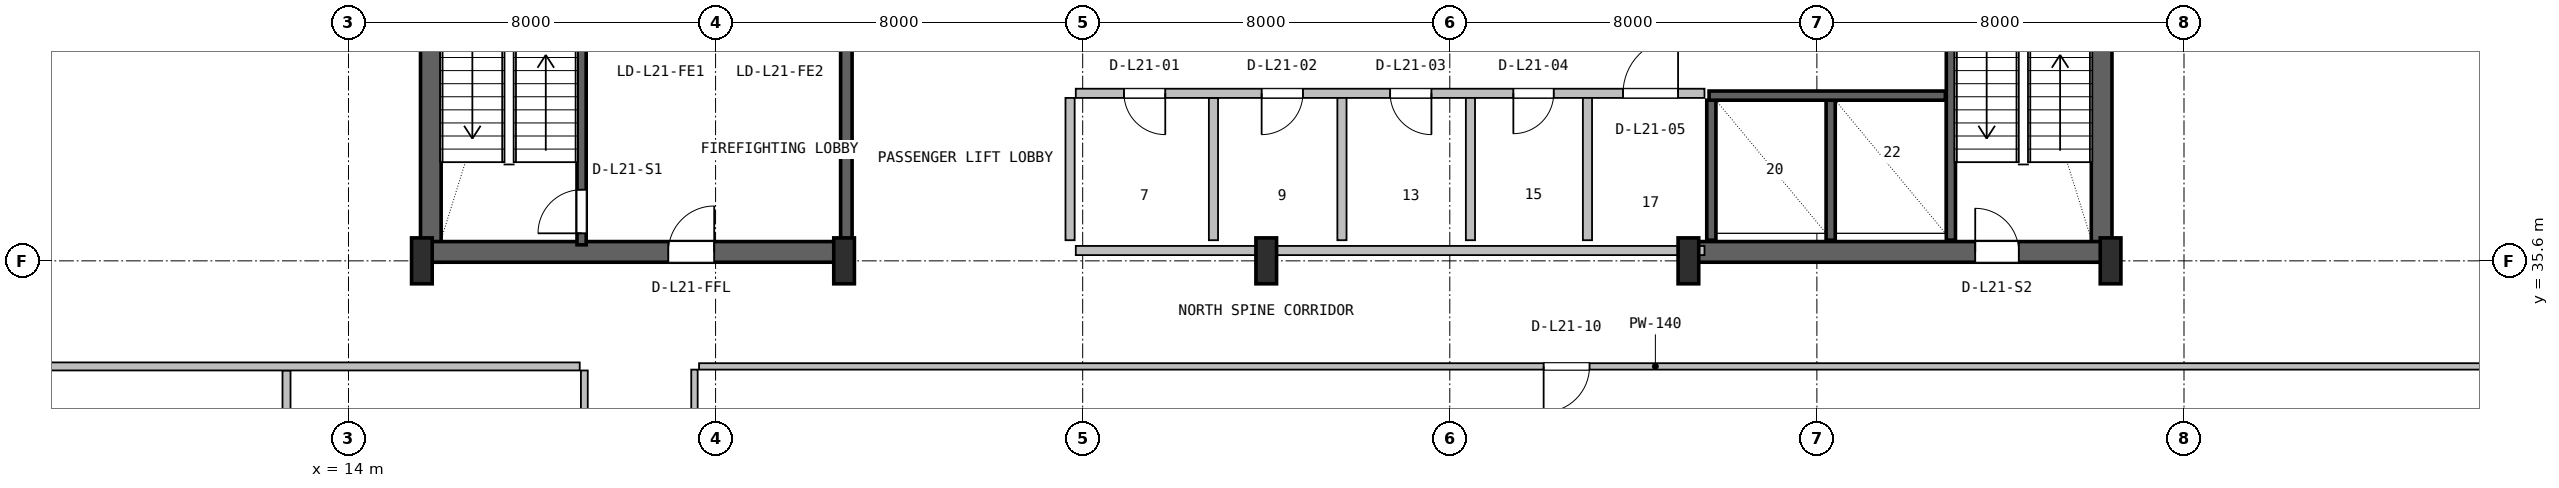
"""IFC4 building model, lengths in metres.
Left out: names, types, materials, properties, quantities, classifications, styles, units other than length and angle.
Written with IfcOpenShell. Run it as: python <this file> out.ifc"""

import sys

from ifc_helpers import new_model, si_unit, direction, frame, frame_2d, origin, origin_2d, place, context, subcontext, project, spatial, rectangle, i_section, extrude, source, transform, mapped, element, fill, save


model = new_model("IFC4")
c1 = context("Model", 3, precision=1e-05, world=origin(), true_north=direction((0.0, 1.0)))
c2 = subcontext(c1, "Body", "Model", "MODEL_VIEW")
j1 = project(units=[si_unit("LENGTHUNIT", "METRE"), si_unit("PLANEANGLEUNIT", "RADIAN")], contexts=[c1])
p1 = place(None, origin())
s1 = spatial("IfcSite", under=j1, at=p1, CompositionType="ELEMENT")
p2 = place(p1, origin())
s2 = spatial("IfcBuilding", under=s1, at=p2, CompositionType="ELEMENT")
p3 = place(p2, frame((0.0, 0.0, 90.8)))
s3 = spatial("IfcBuildingStorey", under=s2, at=p3, CompositionType="ELEMENT", Elevation=90.8)
for number, where, z_axis, x_axis in (
    (1, (15.795, 35.57, 0.0), (0.0, 0.0, 1.0), (0.0, 1.0, 0.0)),
    (2, (52.205, 35.57, 0.0), (0.0, 0.0, 1.0), (0.0, 1.0, 0.0)),
):
    element("IfcWall", number, at=place(p3, frame(where, z_axis=z_axis, x_axis=x_axis)), inside=s3, PredefinedType="SHEAR", context=c2, shape_type="SweptSolid", body=[
        extrude(rectangle(XDim=11.23, YDim=0.45, at=frame_2d((5.615, 0.0))), origin(), (0.0, 0.0, 1.0), 3.55),
    ])
p4 = place(p3, frame((15.57, 35.795, 0.0), z_axis=(0.0, 0.0, 1.0), x_axis=(1.0, 0.0, 0.0)))
e3 = element("IfcWall", 3, at=p4, inside=s3, PredefinedType="SHEAR", context=c2, shape_type="SweptSolid", body=[
    extrude(rectangle(XDim=9.23, YDim=0.45, at=frame_2d((4.615, 0.0))), origin(), (0.0, 0.0, 1.0), 3.55),
])
p5 = place(p4, frame((5.4, 0.0, 0.0)))
e4 = element("IfcOpeningElement", 4, at=p5, cuts=e3, PredefinedType="OPENING", context=c2, shape_type="SweptSolid", body=[
    extrude(rectangle(XDim=1.0, YDim=2.1, at=frame_2d((0.5, 1.05))), frame((0.0, 0.235, 0.0), z_axis=(0.0, -1.0, 0.0), x_axis=(1.0, 0.0, 0.0)), (0.0, 0.0, 1.0), 0.47),
])
p6 = place(p3, frame((43.2, 35.795, 0.0), z_axis=(0.0, 0.0, 1.0), x_axis=(1.0, 0.0, 0.0)))
e5 = element("IfcWall", 5, at=p6, inside=s3, PredefinedType="SHEAR", context=c2, shape_type="SweptSolid", body=[
    extrude(rectangle(XDim=9.23, YDim=0.45, at=frame_2d((4.615, 0.0))), origin(), (0.0, 0.0, 1.0), 3.55),
])
p7 = place(p6, frame((6.25, 0.0, 0.0)))
e6 = element("IfcOpeningElement", 6, at=p7, cuts=e5, PredefinedType="OPENING", context=c2, shape_type="SweptSolid", body=[
    extrude(rectangle(XDim=0.95, YDim=2.1, at=frame_2d((0.475, 1.05))), frame((0.0, 0.235, 0.0), z_axis=(0.0, -1.0, 0.0), x_axis=(1.0, 0.0, 0.0)), (0.0, 0.0, 1.0), 0.47),
])
m1 = source(origin(), c2, "Body", "SweptSolid", [
    extrude(i_section(OverallWidth=0.45, OverallDepth=1.0, WebThickness=0.016, FlangeThickness=0.03, FilletRadius=0.016, at=origin_2d()), origin(), (0.0, 0.0, 1.0), 3.8),
])
for number, where, z_axis, x_axis in (
    (7, (15.6, 35.6, 0.0), (0.0, 0.0, 1.0), (1.0, 0.0, 0.0)),
    (8, (24.8, 35.6, 0.0), (0.0, 0.0, 1.0), (1.0, 0.0, 0.0)),
    (9, (34.0, 35.6, 0.0), (0.0, 0.0, 1.0), (1.0, 0.0, 0.0)),
    (10, (43.2, 35.6, 0.0), (0.0, 0.0, 1.0), (1.0, 0.0, 0.0)),
    (11, (52.4, 35.6, 0.0), (0.0, 0.0, 1.0), (1.0, 0.0, 0.0)),
):
    element("IfcColumn", number, at=place(p3, frame(where, z_axis=z_axis, x_axis=x_axis)), inside=s3, PredefinedType="COLUMN", context=c2, shape_type="MappedRepresentation", body=[
        mapped(m1, transform((0.0, 0.0, 0.0), x_axis=(1.0, 0.0, 0.0), y_axis=(0.0, 1.0, 0.0), z_axis=(0.0, 0.0, 1.0), scale=1.0)),
    ])
p8 = place(p3, frame((19.08, 35.95, 0.0), z_axis=(0.0, 0.0, 1.0), x_axis=(0.0, 1.0, 0.0)))
e12 = element("IfcWall", 12, at=p8, inside=s3, PredefinedType="SHEAR", context=c2, shape_type="SweptSolid", body=[
    extrude(rectangle(XDim=9.65, YDim=0.2, at=frame_2d((4.825, 0.0))), origin(), (0.0, 0.0, 1.0), 3.55),
])
p9 = place(p8, frame((0.25, 0.0, 0.0)))
e13 = element("IfcOpeningElement", 13, at=p9, cuts=e12, PredefinedType="OPENING", context=c2, shape_type="SweptSolid", body=[
    extrude(rectangle(XDim=0.95, YDim=2.1, at=frame_2d((0.475, 1.05))), frame((0.0, 0.11, 0.0), z_axis=(0.0, -1.0, 0.0), x_axis=(1.0, 0.0, 0.0)), (0.0, 0.0, 1.0), 0.22),
])
p10 = place(p3, frame((24.85, 36.05, 0.0), z_axis=(0.0, 0.0, 1.0), x_axis=(0.0, 1.0, 0.0)))
e14 = element("IfcWall", 14, at=p10, inside=s3, PredefinedType="SHEAR", context=c2, shape_type="SweptSolid", body=[
    extrude(rectangle(XDim=10.45, YDim=0.25, at=frame_2d((5.225, 0.0))), origin(), (0.0, 0.0, 1.0), 3.55),
])
p11 = place(p3, frame((48.92, 36.05, 0.0), z_axis=(0.0, 0.0, 1.0), x_axis=(0.0, 1.0, 0.0)))
e15 = element("IfcWall", 15, at=p11, inside=s3, PredefinedType="SHEAR", context=c2, shape_type="SweptSolid", body=[
    extrude(rectangle(XDim=10.5, YDim=0.2, at=frame_2d((5.25, 0.0))), origin(), (0.0, 0.0, 1.0), 3.55),
])
for number, where, z_axis, x_axis in (
    (16, (43.7, 36.05, 0.0), (0.0, 0.0, 1.0), (0.0, 1.0, 0.0)),
    (17, (46.3, 36.05, 0.0), (0.0, 0.0, 1.0), (0.0, 1.0, 0.0)),
):
    element("IfcWall", number, at=place(p3, frame(where, z_axis=z_axis, x_axis=x_axis)), inside=s3, PredefinedType="SHEAR", context=c2, shape_type="SweptSolid", body=[
        extrude(rectangle(XDim=3.05, YDim=0.2, at=frame_2d((1.525, 0.0))), origin(), (0.0, 0.0, 1.0), 3.55),
    ])
p12 = place(p3, frame((43.65, 39.2, 0.0), z_axis=(0.0, 0.0, 1.0), x_axis=(1.0, 0.0, 0.0)))
e18 = element("IfcWall", 18, at=p12, inside=s3, PredefinedType="SHEAR", context=c2, shape_type="SweptSolid", body=[
    extrude(rectangle(XDim=5.15, YDim=0.2, at=frame_2d((2.575, 0.0))), origin(), (0.0, 0.0, 1.0), 3.55),
])
p13 = place(p3, frame((29.85, 35.825, 0.0), z_axis=(0.0, 0.0, 1.0), x_axis=(1.0, 0.0, 0.0)))
e19 = element("IfcWall", 19, at=p13, inside=s3, PredefinedType="SOLIDWALL", context=c2, shape_type="SweptSolid", body=[
    extrude(rectangle(XDim=13.7, YDim=0.2, at=frame_2d((6.85, 0.0))), origin(), (0.0, 0.0, 1.0), 2.325),
])
p14 = place(p3, frame((32.85, 36.05, 0.0), z_axis=(0.0, 0.0, 1.0), x_axis=(0.0, 1.0, 0.0)))
e20 = element("IfcWall", 20, at=p14, inside=s3, PredefinedType="PLUMBINGWALL", context=c2, shape_type="SweptSolid", body=[
    extrude(rectangle(XDim=3.1, YDim=0.2, at=frame_2d((1.55, 0.0))), origin(), (0.0, 0.0, 1.0), 3.53),
])
p15 = place(p3, frame((29.85, 39.25, 0.0), z_axis=(0.0, 0.0, 1.0), x_axis=(1.0, 0.0, 0.0)))
e21 = element("IfcWall", 21, at=p15, inside=s3, PredefinedType="SOLIDWALL", context=c2, shape_type="SweptSolid", body=[
    extrude(rectangle(XDim=13.7, YDim=0.2, at=frame_2d((6.85, 0.0))), origin(), (0.0, 0.0, 1.0), 3.53),
])
p16 = place(p15, frame((1.05, 0.0, 0.0)))
e22 = element("IfcOpeningElement", 22, at=p16, cuts=e21, PredefinedType="OPENING", context=c2, shape_type="SweptSolid", body=[
    extrude(rectangle(XDim=0.9, YDim=2.06, at=frame_2d((0.45, 1.03))), frame((0.0, 0.11, 0.0), z_axis=(0.0, -1.0, 0.0), x_axis=(1.0, 0.0, 0.0)), (0.0, 0.0, 1.0), 0.22),
])
p17 = place(p15, frame((4.05, 0.0, 0.0)))
e23 = element("IfcOpeningElement", 23, at=p17, cuts=e21, PredefinedType="OPENING", context=c2, shape_type="SweptSolid", body=[
    extrude(rectangle(XDim=0.9, YDim=2.06, at=frame_2d((0.45, 1.03))), frame((0.0, 0.11, 0.0), z_axis=(0.0, -1.0, 0.0), x_axis=(1.0, 0.0, 0.0)), (0.0, 0.0, 1.0), 0.22),
])
p18 = place(p15, frame((6.85, 0.0, 0.0)))
e24 = element("IfcOpeningElement", 24, at=p18, cuts=e21, PredefinedType="OPENING", context=c2, shape_type="SweptSolid", body=[
    extrude(rectangle(XDim=0.9, YDim=2.06, at=frame_2d((0.45, 1.03))), frame((0.0, 0.11, 0.0), z_axis=(0.0, -1.0, 0.0), x_axis=(1.0, 0.0, 0.0)), (0.0, 0.0, 1.0), 0.22),
])
p19 = place(p15, frame((9.535, 0.0, 0.0)))
e25 = element("IfcOpeningElement", 25, at=p19, cuts=e21, PredefinedType="OPENING", context=c2, shape_type="SweptSolid", body=[
    extrude(rectangle(XDim=0.88, YDim=2.06, at=frame_2d((0.44, 1.03))), frame((0.0, 0.11, 0.0), z_axis=(0.0, -1.0, 0.0), x_axis=(1.0, 0.0, 0.0)), (0.0, 0.0, 1.0), 0.22),
])
p20 = place(p15, frame((11.925, 0.0, 0.0)))
e26 = element("IfcOpeningElement", 26, at=p20, cuts=e21, PredefinedType="OPENING", context=c2, shape_type="SweptSolid", body=[
    extrude(rectangle(XDim=1.2, YDim=2.1, at=frame_2d((0.6, 1.05))), frame((0.0, 0.11, 0.0), z_axis=(0.0, -1.0, 0.0), x_axis=(1.0, 0.0, 0.0)), (0.0, 0.0, 1.0), 0.22),
])
for number, where, z_axis, x_axis in (
    (27, (29.725, 36.05, 0.0), (0.0, 0.0, 1.0), (0.0, 1.0, 0.0)),
    (28, (35.65, 36.05, 0.0), (0.0, 0.0, 1.0), (0.0, 1.0, 0.0)),
    (29, (38.45, 36.05, 0.0), (0.0, 0.0, 1.0), (0.0, 1.0, 0.0)),
):
    element("IfcWall", number, at=place(p3, frame(where, z_axis=z_axis, x_axis=x_axis)), inside=s3, PredefinedType="PLUMBINGWALL", context=c2, shape_type="SweptSolid", body=[
        extrude(rectangle(XDim=3.1, YDim=0.2, at=frame_2d((1.55, 0.0))), origin(), (0.0, 0.0, 1.0), 3.53),
    ])
p21 = place(p3, frame((41.0, 36.05, 0.0), z_axis=(0.0, 0.0, 1.0), x_axis=(0.0, 1.0, 0.0)))
e30 = element("IfcWall", 30, at=p21, inside=s3, PredefinedType="SOLIDWALL", context=c2, shape_type="SweptSolid", body=[
    extrude(rectangle(XDim=3.1, YDim=0.2, at=frame_2d((1.55, 0.0))), origin(), (0.0, 0.0, 1.0), 3.53),
])
p22 = place(p3, frame((12.65, 14.728, 0.0), z_axis=(0.0, 0.0, 1.0), x_axis=(0.0, 1.0, 0.0)))
e31 = element("IfcWall", 31, at=p22, inside=s3, PredefinedType="PARTITIONING", context=c2, shape_type="SweptSolid", body=[
    extrude(rectangle(XDim=18.484, YDim=0.175, at=frame_2d((9.242, 0.0))), origin(), (0.0, 0.0, 1.0), 3.222),
])
p23 = place(p3, frame((4.68, 33.3, 0.0), z_axis=(0.0, 0.0, 1.0), x_axis=(1.0, 0.0, 0.0)))
e32 = element("IfcWall", 32, at=p23, inside=s3, PredefinedType="PARTITIONING", context=c2, shape_type="SweptSolid", body=[
    extrude(rectangle(XDim=14.36, YDim=0.175, at=frame_2d((7.18, 0.0))), origin(), (0.0, 0.0, 1.0), 3.108),
])
p24 = place(p3, frame((19.14, 14.728, 0.0), z_axis=(0.0, 0.0, 1.0), x_axis=(0.0, 1.0, 0.0)))
e33 = element("IfcWall", 33, at=p24, inside=s3, PredefinedType="PARTITIONING", context=c2, shape_type="SweptSolid", body=[
    extrude(rectangle(XDim=18.484, YDim=0.15, at=frame_2d((9.242, 0.0))), origin(), (0.0, 0.0, 1.0), 3.222),
])
p25 = place(p24, frame((8.802, 0.0, 0.0)))
e34 = element("IfcOpeningElement", 34, at=p25, cuts=e33, PredefinedType="OPENING", context=c2, shape_type="SweptSolid", body=[
    extrude(rectangle(XDim=0.88, YDim=2.06, at=frame_2d((0.44, 1.03))), frame((0.0, 0.085, 0.0), z_axis=(0.0, -1.0, 0.0), x_axis=(1.0, 0.0, 0.0)), (0.0, 0.0, 1.0), 0.17),
])
p26 = place(p3, frame((21.64, 33.3, 0.0), z_axis=(0.0, 0.0, 1.0), x_axis=(1.0, 0.0, 0.0)))
e35 = element("IfcWall", 35, at=p26, inside=s3, PredefinedType="PARTITIONING", context=c2, shape_type="SweptSolid", body=[
    extrude(rectangle(XDim=41.68, YDim=0.14, at=frame_2d((20.84, 0.0))), origin(), (0.0, 0.0, 1.0), 2.83),
])
p27 = place(p26, frame((18.405, 0.0, 0.0)))
e36 = element("IfcOpeningElement", 36, at=p27, cuts=e35, PredefinedType="OPENING", context=c2, shape_type="SweptSolid", body=[
    extrude(rectangle(XDim=1.0, YDim=2.1, at=frame_2d((0.5, 1.05))), frame((0.0, 0.08, 0.0), z_axis=(0.0, -1.0, 0.0), x_axis=(1.0, 0.0, 0.0)), (0.0, 0.0, 1.0), 0.16),
])
p28 = place(p3, frame((21.54, 4.38, 0.0), z_axis=(0.0, 0.0, 1.0), x_axis=(0.0, 1.0, 0.0)))
e37 = element("IfcWall", 37, at=p28, inside=s3, PredefinedType="PARTITIONING", context=c2, shape_type="SweptSolid", body=[
    extrude(rectangle(XDim=28.85, YDim=0.14, at=frame_2d((14.425, 0.0))), origin(), (0.0, 0.0, 1.0), 3.108),
])
m2 = source(origin(), c2, "Body", "SweptSolid", [
    extrude(rectangle(XDim=0.95, YDim=2.1, at=frame_2d((0.475, 1.05))), frame((0.0, 0.025, 0.0), z_axis=(0.0, -1.0, 0.0), x_axis=(1.0, 0.0, 0.0)), (0.0, 0.0, 1.0), 0.05),
])
p29 = place(p9, origin())
e38 = element("IfcDoor", 38, at=p29, inside=s3, OperationType="SINGLE_SWING_LEFT", PredefinedType="DOOR", context=c2, shape_type="MappedRepresentation", body=[
    mapped(m2, transform((0.0, 0.0, 0.0), x_axis=(1.0, 0.0, 0.0), y_axis=(0.0, 1.0, 0.0), z_axis=(0.0, 0.0, 1.0), scale=1.0)),
])
fill(e13, e38)
m3 = source(origin(), c2, "Body", "SweptSolid", [
    extrude(rectangle(XDim=1.0, YDim=2.1, at=frame_2d((0.5, 1.05))), frame((0.0, 0.025, 0.0), z_axis=(0.0, -1.0, 0.0), x_axis=(1.0, 0.0, 0.0)), (0.0, 0.0, 1.0), 0.05),
])
p30 = place(p5, origin())
e39 = element("IfcDoor", 39, at=p30, inside=s3, OperationType="SINGLE_SWING_RIGHT", PredefinedType="DOOR", context=c2, shape_type="MappedRepresentation", body=[
    mapped(m3, transform((0.0, 0.0, 0.0), x_axis=(1.0, 0.0, 0.0), y_axis=(0.0, 1.0, 0.0), z_axis=(0.0, 0.0, 1.0), scale=1.0)),
])
fill(e4, e39)
p31 = place(p7, origin())
e40 = element("IfcDoor", 40, at=p31, inside=s3, OperationType="SINGLE_SWING_LEFT", PredefinedType="DOOR", context=c2, shape_type="MappedRepresentation", body=[
    mapped(m2, transform((0.0, 0.0, 0.0), x_axis=(1.0, 0.0, 0.0), y_axis=(0.0, 1.0, 0.0), z_axis=(0.0, 0.0, 1.0), scale=1.0)),
])
fill(e6, e40)
m4 = source(origin(), c2, "Body", "SweptSolid", [
    extrude(rectangle(XDim=0.9, YDim=2.06, at=frame_2d((0.45, 1.03))), frame((0.0, 0.025, 0.0), z_axis=(0.0, -1.0, 0.0), x_axis=(1.0, 0.0, 0.0)), (0.0, 0.0, 1.0), 0.05),
])
p32 = place(p16, frame((0.9, 0.0, 0.0), z_axis=(0.0, 0.0, 1.0), x_axis=(-1.0, 0.0, 0.0)))
e41 = element("IfcDoor", 41, at=p32, inside=s3, OperationType="SINGLE_SWING_RIGHT", PredefinedType="DOOR", context=c2, shape_type="MappedRepresentation", body=[
    mapped(m4, transform((0.0, 0.0, 0.0), x_axis=(1.0, 0.0, 0.0), y_axis=(0.0, 1.0, 0.0), z_axis=(0.0, 0.0, 1.0), scale=1.0)),
])
fill(e22, e41)
p33 = place(p17, frame((0.9, 0.0, 0.0), z_axis=(0.0, 0.0, 1.0), x_axis=(-1.0, 0.0, 0.0)))
e42 = element("IfcDoor", 42, at=p33, inside=s3, OperationType="SINGLE_SWING_LEFT", PredefinedType="DOOR", context=c2, shape_type="MappedRepresentation", body=[
    mapped(m4, transform((0.0, 0.0, 0.0), x_axis=(1.0, 0.0, 0.0), y_axis=(0.0, 1.0, 0.0), z_axis=(0.0, 0.0, 1.0), scale=1.0)),
])
fill(e23, e42)
p34 = place(p18, frame((0.9, 0.0, 0.0), z_axis=(0.0, 0.0, 1.0), x_axis=(-1.0, 0.0, 0.0)))
e43 = element("IfcDoor", 43, at=p34, inside=s3, OperationType="SINGLE_SWING_RIGHT", PredefinedType="DOOR", context=c2, shape_type="MappedRepresentation", body=[
    mapped(m4, transform((0.0, 0.0, 0.0), x_axis=(1.0, 0.0, 0.0), y_axis=(0.0, 1.0, 0.0), z_axis=(0.0, 0.0, 1.0), scale=1.0)),
])
fill(e24, e43)
m5 = source(origin(), c2, "Body", "SweptSolid", [
    extrude(rectangle(XDim=0.88, YDim=2.06, at=frame_2d((0.44, 1.03))), frame((0.0, 0.025, 0.0), z_axis=(0.0, -1.0, 0.0), x_axis=(1.0, 0.0, 0.0)), (0.0, 0.0, 1.0), 0.05),
])
p35 = place(p19, frame((0.88, 0.0, 0.0), z_axis=(0.0, 0.0, 1.0), x_axis=(-1.0, 0.0, 0.0)))
e44 = element("IfcDoor", 44, at=p35, inside=s3, OperationType="SINGLE_SWING_LEFT", PredefinedType="DOOR", context=c2, shape_type="MappedRepresentation", body=[
    mapped(m5, transform((0.0, 0.0, 0.0), x_axis=(1.0, 0.0, 0.0), y_axis=(0.0, 1.0, 0.0), z_axis=(0.0, 0.0, 1.0), scale=1.0)),
])
fill(e25, e44)
m6 = source(origin(), c2, "Body", "SweptSolid", [
    extrude(rectangle(XDim=1.2, YDim=2.1, at=frame_2d((0.6, 1.05))), frame((0.0, 0.025, 0.0), z_axis=(0.0, -1.0, 0.0), x_axis=(1.0, 0.0, 0.0)), (0.0, 0.0, 1.0), 0.05),
])
p36 = place(p20, origin())
e45 = element("IfcDoor", 45, at=p36, inside=s3, OperationType="SINGLE_SWING_RIGHT", PredefinedType="DOOR", context=c2, shape_type="MappedRepresentation", body=[
    mapped(m6, transform((0.0, 0.0, 0.0), x_axis=(1.0, 0.0, 0.0), y_axis=(0.0, 1.0, 0.0), z_axis=(0.0, 0.0, 1.0), scale=1.0)),
])
fill(e26, e45)
m7 = source(origin(), c2, "Body", "SweptSolid", [
    extrude(rectangle(XDim=1.0, YDim=2.1, at=frame_2d((0.5, 1.05))), frame((0.0, 0.025, 0.0), z_axis=(0.0, -1.0, 0.0), x_axis=(1.0, 0.0, 0.0)), (0.0, 0.0, 1.0), 0.05),
])
p37 = place(p27, frame((1.0, 0.0, 0.0), z_axis=(0.0, 0.0, 1.0), x_axis=(-1.0, 0.0, 0.0)))
e46 = element("IfcDoor", 46, at=p37, inside=s3, OperationType="SINGLE_SWING_LEFT", PredefinedType="DOOR", context=c2, shape_type="MappedRepresentation", body=[
    mapped(m7, transform((0.0, 0.0, 0.0), x_axis=(1.0, 0.0, 0.0), y_axis=(0.0, 1.0, 0.0), z_axis=(0.0, 0.0, 1.0), scale=1.0)),
])
fill(e36, e46)
save(model, sys.argv[1])
